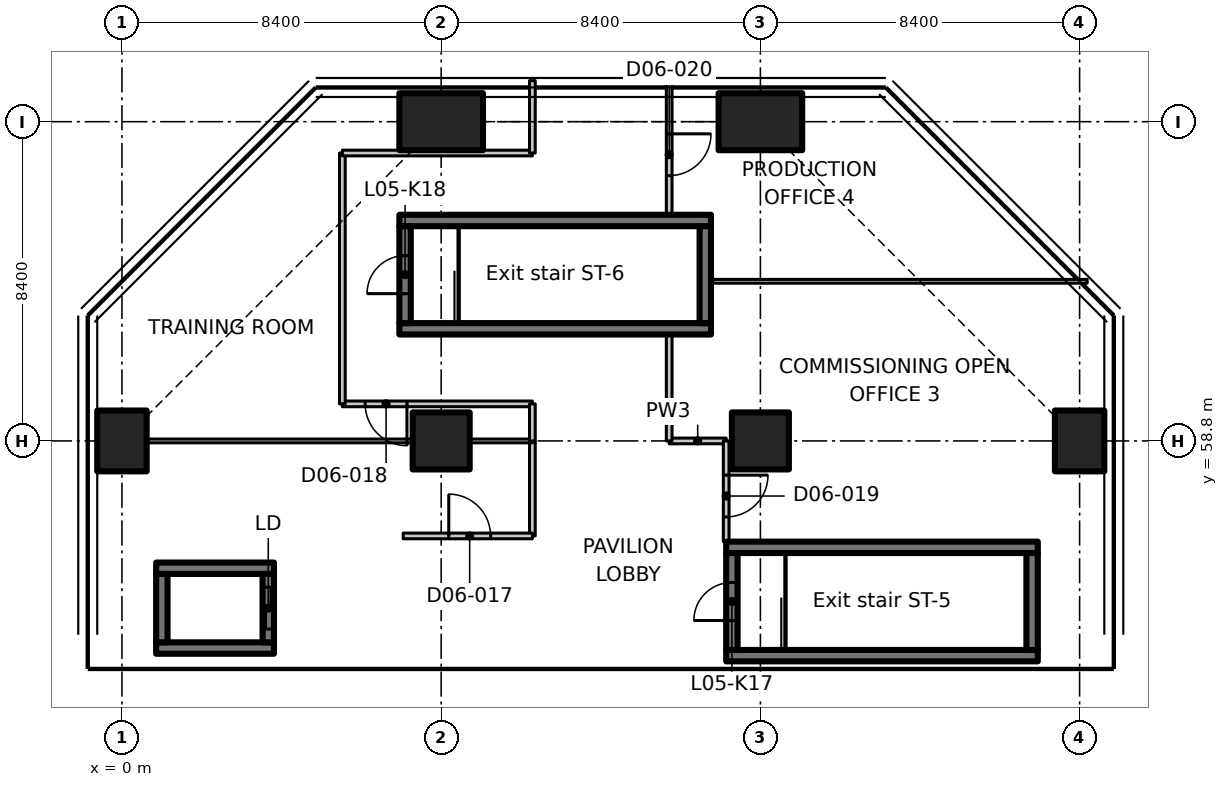
"""IFC4 building model, lengths in metres.
Left out: names, types, materials, properties, quantities, classifications, styles, units other than length and angle.
Written with IfcOpenShell. Run it as: python <this file> out.ifc"""

import sys

from ifc_helpers import new_model, si_unit, direction, frame, frame_2d, origin, origin_2d, place, context, subcontext, project, spatial, polyline, rectangle, outline, extrude, element, fill, save


model = new_model("IFC4")
c1 = context("Model", 3, precision=1e-05, world=origin(), true_north=direction((0.0, 1.0)))
c2 = subcontext(c1, "Body", "Model", "MODEL_VIEW")
j1 = project(units=[si_unit("LENGTHUNIT", "METRE"), si_unit("PLANEANGLEUNIT", "RADIAN")], contexts=[c1])
p1 = place(None, origin())
s1 = spatial("IfcSite", under=j1, at=p1, CompositionType="ELEMENT")
p2 = place(p1, origin())
s2 = spatial("IfcBuilding", under=s1, at=p2, CompositionType="ELEMENT")
p3 = place(p2, frame((0.0, 0.0, 32.0)))
s3 = spatial("IfcBuildingStorey", under=s2, at=p3, CompositionType="ELEMENT", Elevation=32.0)
p4 = place(p3, frame((0.0, 58.8, 0.0), z_axis=(0.0, 0.0, 1.0), x_axis=(1.0, 0.0, 0.0)))
e1 = element("IfcColumn", 1, at=p4, inside=s3, PredefinedType="COLUMN", context=c2, shape_type="SweptSolid", body=[
    extrude(rectangle(XDim=1.3, YDim=1.6, at=origin_2d()), origin(), (0.0, 0.0, 1.0), 4.25),
])
p5 = place(p3, frame((8.4, 58.8, 0.0), z_axis=(0.0, 0.0, 1.0), x_axis=(1.0, 0.0, 0.0)))
e2 = element("IfcColumn", 2, at=p5, inside=s3, PredefinedType="COLUMN", context=c2, shape_type="SweptSolid", body=[
    extrude(rectangle(XDim=1.5, YDim=1.5, at=origin_2d()), origin(), (0.0, 0.0, 1.0), 4.25),
])
p6 = place(p3, frame((8.4, 67.2, 0.0), z_axis=(0.0, 0.0, 1.0), x_axis=(0.0, 1.0, 0.0)))
e3 = element("IfcColumn", 3, at=p6, inside=s3, PredefinedType="COLUMN", context=c2, shape_type="SweptSolid", body=[
    extrude(rectangle(XDim=1.5, YDim=2.2, at=origin_2d()), origin(), (0.0, 0.0, 1.0), 4.25),
])
p7 = place(p3, frame((16.8, 58.8, 0.0), z_axis=(0.0, 0.0, 1.0), x_axis=(1.0, 0.0, 0.0)))
e4 = element("IfcColumn", 4, at=p7, inside=s3, PredefinedType="COLUMN", context=c2, shape_type="SweptSolid", body=[
    extrude(rectangle(XDim=1.5, YDim=1.5, at=origin_2d()), origin(), (0.0, 0.0, 1.0), 4.25),
])
p8 = place(p3, frame((16.8, 67.2, 0.0), z_axis=(0.0, 0.0, 1.0), x_axis=(0.0, 1.0, 0.0)))
e5 = element("IfcColumn", 5, at=p8, inside=s3, PredefinedType="COLUMN", context=c2, shape_type="SweptSolid", body=[
    extrude(rectangle(XDim=1.5, YDim=2.2, at=origin_2d()), origin(), (0.0, 0.0, 1.0), 4.25),
])
p9 = place(p3, frame((25.2, 58.8, 0.0), z_axis=(0.0, 0.0, 1.0), x_axis=(1.0, 0.0, 0.0)))
e6 = element("IfcColumn", 6, at=p9, inside=s3, PredefinedType="COLUMN", context=c2, shape_type="SweptSolid", body=[
    extrude(rectangle(XDim=1.3, YDim=1.6, at=origin_2d()), origin(), (0.0, 0.0, 1.0), 4.25),
])
p10 = place(p2, origin())
s4 = spatial("IfcBuildingStorey", under=s2, at=p10, CompositionType="ELEMENT", Elevation=0.0)
for number, where, z_axis, x_axis in (
    (7, (0.6, 51.6, -6.3), (0.0, 0.0, 1.0), (1.0, 0.0, 0.0)),
    (8, (9.0, 51.6, -6.3), (0.0, 0.0, 1.0), (1.0, 0.0, 0.0)),
):
    element("IfcWall", number, at=place(p10, frame(where, z_axis=z_axis, x_axis=x_axis)), inside=s4, PredefinedType="SOLIDWALL", context=c2, shape_type="SweptSolid", body=[
        extrude(rectangle(XDim=7.2, YDim=2.4, at=frame_2d((3.6, 0.0))), origin(), (0.0, 0.0, 1.0), 42.55),
    ])
p11 = place(p10, frame((17.4, 51.6, -6.3), z_axis=(0.0, 0.0, 1.0), x_axis=(1.0, 0.0, 0.0)))
e9 = element("IfcWall", 9, at=p11, inside=s4, PredefinedType="SOLIDWALL", context=c2, shape_type="SweptSolid", body=[
    extrude(rectangle(XDim=7.2, YDim=2.4, at=frame_2d((3.6, 0.0))), origin(), (0.0, 0.0, 1.0), 42.55),
])
for number, where, z_axis, x_axis in (
    (10, (-1.2, 52.8, 0.0), (0.0, 0.0, 1.0), (0.0, 1.0, 0.0)),
    (11, (26.4, 52.8, 0.0), (0.0, 0.0, 1.0), (0.0, 1.0, 0.0)),
):
    element("IfcWall", number, at=place(p10, frame(where, z_axis=z_axis, x_axis=x_axis)), inside=s4, PredefinedType="SOLIDWALL", context=c2, shape_type="SweptSolid", body=[
        extrude(rectangle(XDim=0.9, YDim=0.6, at=frame_2d((0.45, 0.0))), origin(), (0.0, 0.0, 1.0), 36.23),
    ])
for number, where, z_axis, x_axis in (
    (12, (0.9, 53.35, 0.0), (0.0, 0.0, 1.0), (1.0, 0.0, 0.0)),
    (13, (0.9, 55.45, 0.0), (0.0, 0.0, 1.0), (1.0, 0.0, 0.0)),
):
    element("IfcWall", number, at=place(p3, frame(where, z_axis=z_axis, x_axis=x_axis)), inside=s3, PredefinedType="SHEAR", context=c2, shape_type="SweptSolid", body=[
        extrude(rectangle(XDim=3.1, YDim=0.3, at=frame_2d((1.55, 0.0))), origin(), (0.0, 0.0, 1.0), 4.25),
    ])
p12 = place(p3, frame((1.05, 53.5, 0.0), z_axis=(0.0, 0.0, 1.0), x_axis=(0.0, 1.0, 0.0)))
e14 = element("IfcWall", 14, at=p12, inside=s3, PredefinedType="SHEAR", context=c2, shape_type="SweptSolid", body=[
    extrude(rectangle(XDim=1.8, YDim=0.3, at=frame_2d((0.9, 0.0))), origin(), (0.0, 0.0, 1.0), 4.25),
])
p13 = place(p3, frame((3.85, 53.5, 0.0), z_axis=(0.0, 0.0, 1.0), x_axis=(0.0, 1.0, 0.0)))
e15 = element("IfcWall", 15, at=p13, inside=s3, PredefinedType="SHEAR", context=c2, shape_type="SweptSolid", body=[
    extrude(rectangle(XDim=1.8, YDim=0.3, at=frame_2d((0.9, 0.0))), origin(), (0.0, 0.0, 1.0), 4.25),
])
p14 = place(p13, frame((0.35, 0.0, 0.0)))
e16 = element("IfcOpeningElement", 16, at=p14, cuts=e15, PredefinedType="OPENING", context=c2, shape_type="SweptSolid", body=[
    extrude(rectangle(XDim=1.1, YDim=2.3, at=frame_2d((0.55, 1.15))), frame((0.0, 0.16, 0.0), z_axis=(0.0, -1.0, 0.0), x_axis=(1.0, 0.0, 0.0)), (0.0, 0.0, 1.0), 0.32),
])
for number, where, z_axis, x_axis in (
    (17, (15.9, 53.15, 0.0), (0.0, 0.0, 1.0), (1.0, 0.0, 0.0)),
    (18, (15.9, 56.0, 0.0), (0.0, 0.0, 1.0), (1.0, 0.0, 0.0)),
):
    element("IfcWall", number, at=place(p3, frame(where, z_axis=z_axis, x_axis=x_axis)), inside=s3, PredefinedType="SHEAR", context=c2, shape_type="SweptSolid", body=[
        extrude(rectangle(XDim=8.2, YDim=0.3, at=frame_2d((4.1, 0.0))), origin(), (0.0, 0.0, 1.0), 4.25),
    ])
p15 = place(p3, frame((16.05, 53.3, 0.0), z_axis=(0.0, 0.0, 1.0), x_axis=(0.0, 1.0, 0.0)))
e19 = element("IfcWall", 19, at=p15, inside=s3, PredefinedType="SHEAR", context=c2, shape_type="SweptSolid", body=[
    extrude(rectangle(XDim=2.55, YDim=0.3, at=frame_2d((1.275, 0.0))), origin(), (0.0, 0.0, 1.0), 4.25),
])
p16 = place(p15, frame((0.775, 0.0, 0.0)))
e20 = element("IfcOpeningElement", 20, at=p16, cuts=e19, PredefinedType="OPENING", context=c2, shape_type="SweptSolid", body=[
    extrude(rectangle(XDim=1.0, YDim=2.1, at=frame_2d((0.5, 1.05))), frame((0.0, 0.16, 0.0), z_axis=(0.0, -1.0, 0.0), x_axis=(1.0, 0.0, 0.0)), (0.0, 0.0, 1.0), 0.32),
])
p17 = place(p3, frame((23.95, 53.3, 0.0), z_axis=(0.0, 0.0, 1.0), x_axis=(0.0, 1.0, 0.0)))
e21 = element("IfcWall", 21, at=p17, inside=s3, PredefinedType="SHEAR", context=c2, shape_type="SweptSolid", body=[
    extrude(rectangle(XDim=2.55, YDim=0.3, at=frame_2d((1.275, 0.0))), origin(), (0.0, 0.0, 1.0), 4.25),
])
for number, where, z_axis, x_axis in (
    (22, (7.3, 61.75, 0.0), (0.0, 0.0, 1.0), (1.0, 0.0, 0.0)),
    (23, (7.3, 64.6, 0.0), (0.0, 0.0, 1.0), (1.0, 0.0, 0.0)),
):
    element("IfcWall", number, at=place(p3, frame(where, z_axis=z_axis, x_axis=x_axis)), inside=s3, PredefinedType="SHEAR", context=c2, shape_type="SweptSolid", body=[
        extrude(rectangle(XDim=8.2, YDim=0.3, at=frame_2d((4.1, 0.0))), origin(), (0.0, 0.0, 1.0), 4.25),
    ])
p18 = place(p3, frame((7.45, 61.9, 0.0), z_axis=(0.0, 0.0, 1.0), x_axis=(0.0, 1.0, 0.0)))
e24 = element("IfcWall", 24, at=p18, inside=s3, PredefinedType="SHEAR", context=c2, shape_type="SweptSolid", body=[
    extrude(rectangle(XDim=2.55, YDim=0.3, at=frame_2d((1.275, 0.0))), origin(), (0.0, 0.0, 1.0), 4.25),
])
p19 = place(p18, frame((0.775, 0.0, 0.0)))
e25 = element("IfcOpeningElement", 25, at=p19, cuts=e24, PredefinedType="OPENING", context=c2, shape_type="SweptSolid", body=[
    extrude(rectangle(XDim=1.0, YDim=2.1, at=frame_2d((0.5, 1.05))), frame((0.0, 0.16, 0.0), z_axis=(0.0, -1.0, 0.0), x_axis=(1.0, 0.0, 0.0)), (0.0, 0.0, 1.0), 0.32),
])
p20 = place(p3, frame((15.35, 61.9, 0.0), z_axis=(0.0, 0.0, 1.0), x_axis=(0.0, 1.0, 0.0)))
e26 = element("IfcWall", 26, at=p20, inside=s3, PredefinedType="SHEAR", context=c2, shape_type="SweptSolid", body=[
    extrude(rectangle(XDim=2.55, YDim=0.3, at=frame_2d((1.275, 0.0))), origin(), (0.0, 0.0, 1.0), 4.25),
])
p21 = place(p3, frame((10.8, 56.3, 0.0), z_axis=(0.0, 0.0, 1.0), x_axis=(0.0, 1.0, 0.0)))
e27 = element("IfcWall", 27, at=p21, inside=s3, PredefinedType="PARTITIONING", context=c2, shape_type="SweptSolid", body=[
    extrude(rectangle(XDim=2.5, YDim=0.15, at=frame_2d((1.25, 0.0))), origin(), (0.0, 0.0, 1.0), 4.23),
])
p22 = place(p3, frame((14.4, 58.8, 0.0), z_axis=(0.0, 0.0, 1.0), x_axis=(1.0, 0.0, 0.0)))
e28 = element("IfcWall", 28, at=p22, inside=s3, PredefinedType="PARTITIONING", context=c2, shape_type="SweptSolid", body=[
    extrude(rectangle(XDim=1.5, YDim=0.15, at=frame_2d((0.75, 0.0))), origin(), (0.0, 0.0, 1.0), 4.23),
])
p23 = place(p3, frame((15.9, 58.8, 0.0), z_axis=(0.0, 0.0, 1.0), x_axis=(0.0, -1.0, 0.0)))
e29 = element("IfcWall", 29, at=p23, inside=s3, PredefinedType="PARTITIONING", context=c2, shape_type="SweptSolid", body=[
    extrude(rectangle(XDim=2.65, YDim=0.15, at=frame_2d((1.325, 0.0))), origin(), (0.0, 0.0, 1.0), 4.23),
])
p24 = place(p23, frame((0.9, 0.0, 0.0)))
e30 = element("IfcOpeningElement", 30, at=p24, cuts=e29, PredefinedType="OPENING", context=c2, shape_type="SweptSolid", body=[
    extrude(rectangle(XDim=1.1, YDim=2.1, at=frame_2d((0.55, 1.05))), frame((0.0, 0.085, 0.0), z_axis=(0.0, -1.0, 0.0), x_axis=(1.0, 0.0, 0.0)), (0.0, 0.0, 1.0), 0.17),
])
p25 = place(p3, frame((10.8, 59.775, 0.0), z_axis=(0.0, 0.0, 1.0), x_axis=(-1.0, 0.0, 0.0)))
e31 = element("IfcWall", 31, at=p25, inside=s3, PredefinedType="PARTITIONING", context=c2, shape_type="SweptSolid", body=[
    extrude(rectangle(XDim=5.0, YDim=0.15, at=frame_2d((2.5, 0.0))), origin(), (0.0, 0.0, 1.0), 4.23),
])
p26 = place(p25, frame((3.3, 0.0, 0.0)))
e32 = element("IfcOpeningElement", 32, at=p26, cuts=e31, PredefinedType="OPENING", context=c2, shape_type="SweptSolid", body=[
    extrude(rectangle(XDim=1.1, YDim=2.1, at=frame_2d((0.55, 1.05))), frame((0.0, 0.085, 0.0), z_axis=(0.0, -1.0, 0.0), x_axis=(1.0, 0.0, 0.0)), (0.0, 0.0, 1.0), 0.17),
])
p27 = place(p3, frame((5.8, 59.775, 0.0), z_axis=(0.0, 0.0, 1.0), x_axis=(0.0, 1.0, 0.0)))
e33 = element("IfcWall", 33, at=p27, inside=s3, PredefinedType="PARTITIONING", context=c2, shape_type="SweptSolid", body=[
    extrude(outline(polyline([(0.0, 0.0), (6.6, 0.0), (6.6, 4.23), (5.516, 4.23), (5.514, 3.88), (4.136, 3.88), (4.134, 4.23), (0.0, 4.23), (0.0, 0.0)])), frame((0.0, 0.075, 0.0), z_axis=(0.0, -1.0, 0.0), x_axis=(1.0, 0.0, 0.0)), (0.0, 0.0, 1.0), 0.15),
])
p28 = place(p3, frame((5.8, 66.375, 0.0), z_axis=(0.0, 0.0, 1.0), x_axis=(1.0, 0.0, 0.0)))
e34 = element("IfcWall", 34, at=p28, inside=s3, PredefinedType="PARTITIONING", context=c2, shape_type="SweptSolid", body=[
    extrude(outline(polyline([(0.0, 0.0), (5.0, 0.0), (5.0, 4.23), (2.466, 4.23), (2.464, 3.88), (1.086, 3.88), (1.084, 4.23), (0.0, 4.23), (0.0, 0.0)])), frame((0.0, 0.075, 0.0), z_axis=(0.0, -1.0, 0.0), x_axis=(1.0, 0.0, 0.0)), (0.0, 0.0, 1.0), 0.15),
])
p29 = place(p3, frame((7.4, 56.3, 0.0), z_axis=(0.0, 0.0, 1.0), x_axis=(1.0, 0.0, 0.0)))
e35 = element("IfcWall", 35, at=p29, inside=s3, PredefinedType="PARTITIONING", context=c2, shape_type="SweptSolid", body=[
    extrude(rectangle(XDim=3.4, YDim=0.15, at=frame_2d((1.7, 0.0))), origin(), (0.0, 0.0, 1.0), 4.23),
])
p30 = place(p29, frame((1.2, 0.0, 0.0)))
e36 = element("IfcOpeningElement", 36, at=p30, cuts=e35, PredefinedType="OPENING", context=c2, shape_type="SweptSolid", body=[
    extrude(rectangle(XDim=1.1, YDim=2.1, at=frame_2d((0.55, 1.05))), frame((0.0, 0.085, 0.0), z_axis=(0.0, -1.0, 0.0), x_axis=(1.0, 0.0, 0.0)), (0.0, 0.0, 1.0), 0.17),
])
p31 = place(p3, frame((10.8, 66.375, 0.0), z_axis=(0.0, 0.0, 1.0), x_axis=(0.0, 1.0, 0.0)))
e37 = element("IfcWall", 37, at=p31, inside=s3, PredefinedType="PARTITIONING", context=c2, shape_type="SweptSolid", body=[
    extrude(rectangle(XDim=1.905, YDim=0.15, at=frame_2d((0.953, 0.0))), origin(), (0.0, 0.0, 1.0), 3.88),
])
p32 = place(p3, frame((14.4, 68.28, 0.0), z_axis=(0.0, 0.0, 1.0), x_axis=(0.0, -1.0, 0.0)))
e38 = element("IfcWall", 38, at=p32, inside=s3, PredefinedType="PARTITIONING", context=c2, shape_type="SweptSolid", body=[
    extrude(rectangle(XDim=3.53, YDim=0.15, at=frame_2d((1.765, 0.0))), origin(), (0.0, 0.0, 1.0), 3.88),
])
p33 = place(p32, frame((1.4, 0.0, 0.0)))
e39 = element("IfcOpeningElement", 39, at=p33, cuts=e38, PredefinedType="OPENING", context=c2, shape_type="SweptSolid", body=[
    extrude(rectangle(XDim=1.1, YDim=2.1, at=frame_2d((0.55, 1.05))), frame((0.0, 0.085, 0.0), z_axis=(0.0, -1.0, 0.0), x_axis=(1.0, 0.0, 0.0)), (0.0, 0.0, 1.0), 0.17),
])
p34 = place(p3, frame((0.67, 58.8, 0.0), z_axis=(0.0, 0.0, 1.0), x_axis=(1.0, 0.0, 0.0)))
e40 = element("IfcWall", 40, at=p34, inside=s3, PredefinedType="PARTITIONING", context=c2, shape_type="SweptSolid", body=[
    extrude(rectangle(XDim=6.96, YDim=0.1, at=frame_2d((3.48, 0.0))), origin(), (0.0, 0.0, 1.0), 4.23),
])
p35 = place(p3, frame((9.17, 58.8, 0.0), z_axis=(0.0, 0.0, 1.0), x_axis=(1.0, 0.0, 0.0)))
e41 = element("IfcWall", 41, at=p35, inside=s3, PredefinedType="PARTITIONING", context=c2, shape_type="SweptSolid", body=[
    extrude(rectangle(XDim=1.63, YDim=0.1, at=frame_2d((0.815, 0.0))), origin(), (0.0, 0.0, 1.0), 4.23),
])
p36 = place(p3, frame((10.8, 59.775, 0.0), z_axis=(0.0, 0.0, 1.0), x_axis=(0.0, -1.0, 0.0)))
e42 = element("IfcWall", 42, at=p36, inside=s3, PredefinedType="PARTITIONING", context=c2, shape_type="SweptSolid", body=[
    extrude(rectangle(XDim=0.975, YDim=0.15, at=frame_2d((0.487, 0.0))), origin(), (0.0, 0.0, 1.0), 4.23),
])
p37 = place(p3, frame((15.5, 63.0, 0.0), z_axis=(0.0, 0.0, 1.0), x_axis=(1.0, 0.0, 0.0)))
e43 = element("IfcWall", 43, at=p37, inside=s3, PredefinedType="PARTITIONING", context=c2, shape_type="SweptSolid", body=[
    extrude(outline(polyline([(0.0, 0.0), (9.9, 0.0), (9.9, 4.23), (6.166, 4.23), (6.164, 3.88), (4.836, 3.88), (4.834, 4.23), (0.0, 4.23), (0.0, 0.0)])), frame((0.0, 0.05, 0.0), z_axis=(0.0, -1.0, 0.0), x_axis=(1.0, 0.0, 0.0)), (0.0, 0.0, 1.0), 0.1),
])
p38 = place(p3, frame((14.4, 58.8, 0.0), z_axis=(0.0, 0.0, 1.0), x_axis=(0.0, 1.0, 0.0)))
e44 = element("IfcWall", 44, at=p38, inside=s3, PredefinedType="PARTITIONING", context=c2, shape_type="SweptSolid", body=[
    extrude(rectangle(XDim=2.8, YDim=0.15, at=frame_2d((1.4, 0.0))), origin(), (0.0, 0.0, 1.0), 4.23),
])
p39 = place(p14, origin())
e45 = element("IfcDoor", 45, at=p39, inside=s3, OperationType="SLIDING_TO_LEFT", PredefinedType="DOOR", context=c2, shape_type="SweptSolid", body=[
    extrude(rectangle(XDim=1.1, YDim=2.3, at=frame_2d((0.55, 1.15))), frame((0.0, 0.025, 0.0), z_axis=(0.0, -1.0, 0.0), x_axis=(1.0, 0.0, 0.0)), (0.0, 0.0, 1.0), 0.05),
])
fill(e16, e45)
p40 = place(p16, origin())
e46 = element("IfcDoor", 46, at=p40, inside=s3, OperationType="SINGLE_SWING_RIGHT", PredefinedType="DOOR", context=c2, shape_type="SweptSolid", body=[
    extrude(rectangle(XDim=1.0, YDim=2.1, at=frame_2d((0.5, 1.05))), frame((0.0, 0.025, 0.0), z_axis=(0.0, -1.0, 0.0), x_axis=(1.0, 0.0, 0.0)), (0.0, 0.0, 1.0), 0.05),
])
fill(e20, e46)
p41 = place(p19, origin())
e47 = element("IfcDoor", 47, at=p41, inside=s3, OperationType="SINGLE_SWING_LEFT", PredefinedType="DOOR", context=c2, shape_type="SweptSolid", body=[
    extrude(rectangle(XDim=1.0, YDim=2.1, at=frame_2d((0.5, 1.05))), frame((0.0, 0.025, 0.0), z_axis=(0.0, -1.0, 0.0), x_axis=(1.0, 0.0, 0.0)), (0.0, 0.0, 1.0), 0.05),
])
fill(e25, e47)
p42 = place(p30, origin())
e48 = element("IfcDoor", 48, at=p42, inside=s3, OperationType="SINGLE_SWING_LEFT", PredefinedType="DOOR", context=c2, shape_type="SweptSolid", body=[
    extrude(rectangle(XDim=1.1, YDim=2.1, at=frame_2d((0.55, 1.05))), frame((0.0, 0.025, 0.0), z_axis=(0.0, -1.0, 0.0), x_axis=(1.0, 0.0, 0.0)), (0.0, 0.0, 1.0), 0.05),
])
fill(e36, e48)
p43 = place(p26, origin())
e49 = element("IfcDoor", 49, at=p43, inside=s3, OperationType="SINGLE_SWING_LEFT", PredefinedType="DOOR", context=c2, shape_type="SweptSolid", body=[
    extrude(rectangle(XDim=1.1, YDim=2.1, at=frame_2d((0.55, 1.05))), frame((0.0, 0.025, 0.0), z_axis=(0.0, -1.0, 0.0), x_axis=(1.0, 0.0, 0.0)), (0.0, 0.0, 1.0), 0.05),
])
fill(e32, e49)
p44 = place(p24, origin())
e50 = element("IfcDoor", 50, at=p44, inside=s3, OperationType="SINGLE_SWING_LEFT", PredefinedType="DOOR", context=c2, shape_type="SweptSolid", body=[
    extrude(rectangle(XDim=1.1, YDim=2.1, at=frame_2d((0.55, 1.05))), frame((0.0, 0.025, 0.0), z_axis=(0.0, -1.0, 0.0), x_axis=(1.0, 0.0, 0.0)), (0.0, 0.0, 1.0), 0.05),
])
fill(e30, e50)
p45 = place(p33, origin())
e51 = element("IfcDoor", 51, at=p45, inside=s3, OperationType="SINGLE_SWING_LEFT", PredefinedType="DOOR", context=c2, shape_type="SweptSolid", body=[
    extrude(rectangle(XDim=1.1, YDim=2.1, at=frame_2d((0.55, 1.05))), frame((0.0, 0.025, 0.0), z_axis=(0.0, -1.0, 0.0), x_axis=(1.0, 0.0, 0.0)), (0.0, 0.0, 1.0), 0.05),
])
fill(e39, e51)
save(model, sys.argv[1])
